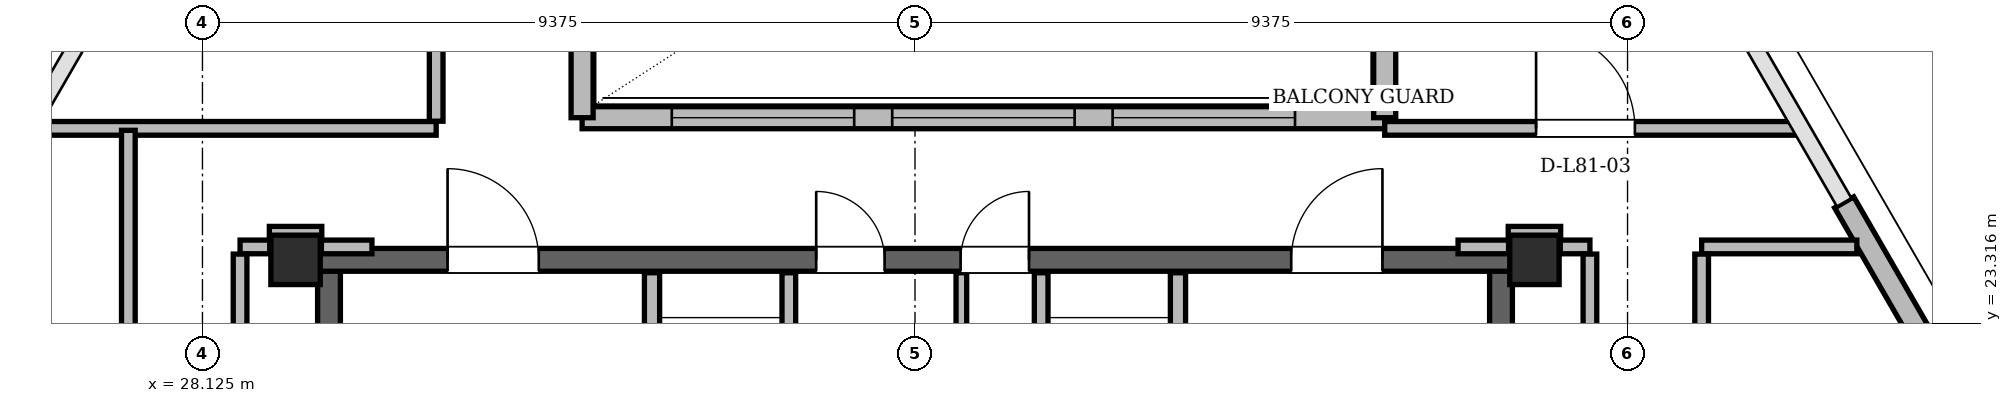
"""IFC4 building model, lengths in metres.
Left out: names, types, materials, properties, quantities, classifications, styles, units other than length and angle.
Written with IfcOpenShell. Run it as: python <this file> out.ifc"""

import sys

from ifc_helpers import new_model, si_unit, direction, frame, frame_2d, origin, origin_2d, place, context, subcontext, project, spatial, rectangle, hollow_rectangle, extrude, element, fill, save


model = new_model("IFC4")
c1 = context("Model", 3, precision=1e-05, world=origin(), true_north=direction((0.0, 1.0)))
c2 = subcontext(c1, "Body", "Model", "MODEL_VIEW")
j1 = project(units=[si_unit("LENGTHUNIT", "METRE"), si_unit("PLANEANGLEUNIT", "RADIAN")], contexts=[c1])
p1 = place(None, origin())
s1 = spatial("IfcSite", under=j1, at=p1, CompositionType="ELEMENT")
p2 = place(p1, origin())
s2 = spatial("IfcBuilding", under=s1, at=p2, CompositionType="ELEMENT")
p3 = place(p2, frame((0.0, 0.0, 309.6)))
s3 = spatial("IfcBuildingStorey", under=s2, at=p3, CompositionType="ELEMENT", Elevation=309.6)
for number, where, z_axis, x_axis in (
    (1, (45.65, 24.15, 0.0), (0.0, 0.0, 1.0), (1.0, 0.0, 0.0)),
    (2, (29.35, 24.15, 0.0), (0.0, 0.0, 1.0), (1.0, 0.0, 0.0)),
):
    element("IfcColumn", number, at=place(p3, frame(where, z_axis=z_axis, x_axis=x_axis)), inside=s3, PredefinedType="COLUMN", context=c2, shape_type="SweptSolid", body=[
        extrude(hollow_rectangle(XDim=0.65, YDim=0.65, WallThickness=0.05, at=origin_2d()), origin(), (0.0, 0.0, 1.0), 4.5),
    ])
for number, where, z_axis, x_axis in (
    (3, (29.79, 11.0, 0.0), (0.0, 0.0, 1.0), (0.0, 1.0, 0.0)),
    (4, (45.21, 11.0, 0.0), (0.0, 0.0, 1.0), (0.0, 1.0, 0.0)),
):
    element("IfcWall", number, at=place(p3, frame(where, z_axis=z_axis, x_axis=x_axis)), inside=s3, PredefinedType="SHEAR", context=c2, shape_type="SweptSolid", body=[
        extrude(rectangle(XDim=13.3, YDim=0.3, at=frame_2d((6.65, 0.0))), origin(), (0.0, 0.0, 1.0), 4.24),
    ])
p4 = place(p3, frame((29.65, 24.15, 0.0), z_axis=(0.0, 0.0, 1.0), x_axis=(1.0, 0.0, 0.0)))
e5 = element("IfcWall", 5, at=p4, inside=s3, PredefinedType="SHEAR", context=c2, shape_type="SweptSolid", body=[
    extrude(rectangle(XDim=15.7, YDim=0.3, at=frame_2d((7.85, 0.0))), origin(), (0.0, 0.0, 1.0), 4.24),
])
p5 = place(p4, frame((1.7, 0.0, 0.0)))
e6 = element("IfcOpeningElement", 6, at=p5, cuts=e5, PredefinedType="OPENING", context=c2, shape_type="SweptSolid", body=[
    extrude(rectangle(XDim=1.2, YDim=2.2, at=frame_2d((0.6, 1.1))), frame((0.0, 0.15, 0.0), z_axis=(0.0, -1.0, 0.0), x_axis=(1.0, 0.0, 0.0)), (0.0, 0.0, 1.0), 0.3),
])
p6 = place(p4, frame((12.8, 0.0, 0.0)))
e7 = element("IfcOpeningElement", 7, at=p6, cuts=e5, PredefinedType="OPENING", context=c2, shape_type="SweptSolid", body=[
    extrude(rectangle(XDim=1.2, YDim=2.2, at=frame_2d((0.6, 1.1))), frame((0.0, 0.15, 0.0), z_axis=(0.0, -1.0, 0.0), x_axis=(1.0, 0.0, 0.0)), (0.0, 0.0, 1.0), 0.3),
])
p7 = place(p4, frame((6.55, 0.0, 0.0)))
e8 = element("IfcOpeningElement", 8, at=p7, cuts=e5, PredefinedType="OPENING", context=c2, shape_type="SweptSolid", body=[
    extrude(rectangle(XDim=0.9, YDim=2.05, at=frame_2d((0.45, 1.025))), frame((0.0, 0.15, 0.0), z_axis=(0.0, -1.0, 0.0), x_axis=(1.0, 0.0, 0.0)), (0.0, 0.0, 1.0), 0.3),
])
p8 = place(p4, frame((8.45, 0.0, 0.0)))
e9 = element("IfcOpeningElement", 9, at=p8, cuts=e5, PredefinedType="OPENING", context=c2, shape_type="SweptSolid", body=[
    extrude(rectangle(XDim=0.9, YDim=2.05, at=frame_2d((0.45, 1.025))), frame((0.0, 0.15, 0.0), z_axis=(0.0, -1.0, 0.0), x_axis=(1.0, 0.0, 0.0)), (0.0, 0.0, 1.0), 0.3),
])
p9 = place(p3, frame((58.186, 10.252, 0.0), z_axis=(0.0, 0.0, 1.0), x_axis=(-0.500001379048, 0.866024607589, 0.0)))
e10 = element("IfcWall", 10, at=p9, inside=s3, PredefinedType="SOLIDWALL", context=c2, shape_type="SweptSolid", body=[
    extrude(rectangle(XDim=16.921, YDim=0.29, at=frame_2d((8.461, 0.0))), origin(), (0.0, 0.0, 1.0), 3.618),
])
p10 = place(p9, frame((2.222, 0.0, 0.85)))
e11 = element("IfcOpeningElement", 11, at=p10, cuts=e10, PredefinedType="OPENING", context=c2, shape_type="SweptSolid", body=[
    extrude(rectangle(XDim=3.0, YDim=2.25, at=frame_2d((1.5, 1.125))), frame((0.0, 0.145, 0.0), z_axis=(0.0, -1.0, 0.0), x_axis=(1.0, 0.0, 0.0)), (0.0, 0.0, 1.0), 0.29),
])
p11 = place(p9, frame((7.788, 0.0, 0.85)))
e12 = element("IfcOpeningElement", 12, at=p11, cuts=e10, PredefinedType="OPENING", context=c2, shape_type="SweptSolid", body=[
    extrude(rectangle(XDim=2.6, YDim=1.95, at=frame_2d((1.3, 0.975))), frame((0.0, 0.145, 0.0), z_axis=(0.0, -1.0, 0.0), x_axis=(1.0, 0.0, 0.0)), (0.0, 0.0, 1.0), 0.29),
])
p12 = place(p3, frame((33.12, 26.02, 0.0), z_axis=(0.0, 0.0, 1.0), x_axis=(1.0, 0.0, 0.0)))
e13 = element("IfcWall", 13, at=p12, inside=s3, PredefinedType="SOLIDWALL", context=c2, shape_type="SweptSolid", body=[
    extrude(rectangle(XDim=10.56, YDim=0.29, at=frame_2d((5.28, 0.0))), origin(), (0.0, 0.0, 1.0), 4.24),
])
p13 = place(p12, frame((1.18, 0.0, 0.9)))
e14 = element("IfcOpeningElement", 14, at=p13, cuts=e13, PredefinedType="OPENING", context=c2, shape_type="SweptSolid", body=[
    extrude(rectangle(XDim=2.4, YDim=1.9, at=frame_2d((1.2, 0.95))), frame((0.0, 0.145, 0.0), z_axis=(0.0, -1.0, 0.0), x_axis=(1.0, 0.0, 0.0)), (0.0, 0.0, 1.0), 0.29),
])
p14 = place(p12, frame((4.08, 0.0, 0.9)))
e15 = element("IfcOpeningElement", 15, at=p14, cuts=e13, PredefinedType="OPENING", context=c2, shape_type="SweptSolid", body=[
    extrude(rectangle(XDim=2.4, YDim=1.9, at=frame_2d((1.2, 0.95))), frame((0.0, 0.145, 0.0), z_axis=(0.0, -1.0, 0.0), x_axis=(1.0, 0.0, 0.0)), (0.0, 0.0, 1.0), 0.29),
])
p15 = place(p12, frame((6.98, 0.0, 0.9)))
e16 = element("IfcOpeningElement", 16, at=p15, cuts=e13, PredefinedType="OPENING", context=c2, shape_type="SweptSolid", body=[
    extrude(rectangle(XDim=2.4, YDim=1.9, at=frame_2d((1.2, 0.95))), frame((0.0, 0.145, 0.0), z_axis=(0.0, -1.0, 0.0), x_axis=(1.0, 0.0, 0.0)), (0.0, 0.0, 1.0), 0.29),
])
p16 = place(p3, frame((33.12, 26.02, 0.0), z_axis=(0.0, 0.0, 1.0), x_axis=(0.0, 1.0, 0.0)))
e17 = element("IfcWall", 17, at=p16, inside=s3, PredefinedType="SOLIDWALL", context=c2, shape_type="SweptSolid", body=[
    extrude(rectangle(XDim=6.96, YDim=0.29, at=frame_2d((3.48, 0.0))), origin(), (0.0, 0.0, 1.0), 4.24),
])
p17 = place(p3, frame((43.68, 26.02, 0.0), z_axis=(0.0, 0.0, 1.0), x_axis=(0.0, 1.0, 0.0)))
e18 = element("IfcWall", 18, at=p17, inside=s3, PredefinedType="SOLIDWALL", context=c2, shape_type="SweptSolid", body=[
    extrude(rectangle(XDim=6.96, YDim=0.29, at=frame_2d((3.48, 0.0))), origin(), (0.0, 0.0, 1.0), 3.826),
])
p18 = place(p3, frame((34.04, 19.48, 0.0), z_axis=(0.0, 0.0, 1.0), x_axis=(0.0, 1.0, 0.0)))
e19 = element("IfcWall", 19, at=p18, inside=s3, PredefinedType="PARTITIONING", context=c2, shape_type="SweptSolid", body=[
    extrude(rectangle(XDim=4.5, YDim=0.2, at=frame_2d((2.25, 0.0))), origin(), (0.0, 0.0, 1.0), 4.24),
])
p19 = place(p18, frame((2.12, 0.0, 0.0)))
e20 = element("IfcOpeningElement", 20, at=p19, cuts=e19, PredefinedType="OPENING", context=c2, shape_type="SweptSolid", body=[
    extrude(rectangle(XDim=1.1, YDim=2.2, at=frame_2d((0.55, 1.1))), frame((0.0, 0.1, 0.0), z_axis=(0.0, -1.0, 0.0), x_axis=(1.0, 0.0, 0.0)), (0.0, 0.0, 1.0), 0.2),
])
p20 = place(p3, frame((35.84, 20.96, 0.0), z_axis=(0.0, 0.0, 1.0), x_axis=(0.0, 1.0, 0.0)))
e21 = element("IfcWall", 21, at=p20, inside=s3, PredefinedType="PARTITIONING", context=c2, shape_type="SweptSolid", body=[
    extrude(rectangle(XDim=3.02, YDim=0.18, at=frame_2d((1.51, 0.0))), origin(), (0.0, 0.0, 1.0), 4.24),
])
p21 = place(p3, frame((40.96, 19.48, 0.0), z_axis=(0.0, 0.0, 1.0), x_axis=(0.0, 1.0, 0.0)))
e22 = element("IfcWall", 22, at=p21, inside=s3, PredefinedType="PARTITIONING", context=c2, shape_type="SweptSolid", body=[
    extrude(rectangle(XDim=4.5, YDim=0.2, at=frame_2d((2.25, 0.0))), origin(), (0.0, 0.0, 1.0), 4.24),
])
p22 = place(p21, frame((2.12, 0.0, 0.0)))
e23 = element("IfcOpeningElement", 23, at=p22, cuts=e22, PredefinedType="OPENING", context=c2, shape_type="SweptSolid", body=[
    extrude(rectangle(XDim=1.1, YDim=2.2, at=frame_2d((0.55, 1.1))), frame((0.0, 0.1, 0.0), z_axis=(0.0, -1.0, 0.0), x_axis=(1.0, 0.0, 0.0)), (0.0, 0.0, 1.0), 0.2),
])
p23 = place(p3, frame((39.16, 20.96, 0.0), z_axis=(0.0, 0.0, 1.0), x_axis=(0.0, 1.0, 0.0)))
e24 = element("IfcWall", 24, at=p23, inside=s3, PredefinedType="PARTITIONING", context=c2, shape_type="SweptSolid", body=[
    extrude(rectangle(XDim=3.02, YDim=0.18, at=frame_2d((1.51, 0.0))), origin(), (0.0, 0.0, 1.0), 4.24),
])
p24 = place(p3, frame((38.11, 21.06, 0.0), z_axis=(0.0, 0.0, 1.0), x_axis=(0.0, 1.0, 0.0)))
e25 = element("IfcWall", 25, at=p24, inside=s3, PredefinedType="PARTITIONING", context=c2, shape_type="SweptSolid", body=[
    extrude(rectangle(XDim=2.92, YDim=0.14, at=frame_2d((1.46, 0.0))), origin(), (0.0, 0.0, 1.0), 4.24),
])
p25 = place(p3, frame((28.62, 24.32, 0.0), z_axis=(0.0, 0.0, 1.0), x_axis=(1.0, 0.0, 0.0)))
e26 = element("IfcWall", 26, at=p25, inside=s3, PredefinedType="PARTITIONING", context=c2, shape_type="SweptSolid", body=[
    extrude(rectangle(XDim=0.39, YDim=0.18, at=frame_2d((0.195, 0.0))), origin(), (0.0, 0.0, 1.0), 4.24),
])
for number, where, z_axis, x_axis in (
    (27, (29.69, 24.32, 0.0), (0.0, 0.0, 1.0), (1.0, 0.0, 0.0)),
    (28, (44.645, 24.32, 0.0), (0.0, 0.0, 1.0), (1.0, 0.0, 0.0)),
):
    element("IfcWall", number, at=place(p3, frame(where, z_axis=z_axis, x_axis=x_axis)), inside=s3, PredefinedType="PARTITIONING", context=c2, shape_type="SweptSolid", body=[
        extrude(rectangle(XDim=0.665, YDim=0.18, at=frame_2d((0.333, 0.0))), origin(), (0.0, 0.0, 1.0), 3.38),
    ])
p26 = place(p3, frame((45.99, 24.32, 0.0), z_axis=(0.0, 0.0, 1.0), x_axis=(1.0, 0.0, 0.0)))
e29 = element("IfcWall", 29, at=p26, inside=s3, PredefinedType="PARTITIONING", context=c2, shape_type="SweptSolid", body=[
    extrude(rectangle(XDim=0.39, YDim=0.18, at=frame_2d((0.195, 0.0))), origin(), (0.0, 0.0, 1.0), 4.24),
])
p27 = place(p3, frame((47.85, 24.32, 0.0), z_axis=(0.0, 0.0, 1.0), x_axis=(1.0, 0.0, 0.0)))
e30 = element("IfcWall", 30, at=p27, inside=s3, PredefinedType="PARTITIONING", context=c2, shape_type="SweptSolid", body=[
    extrude(rectangle(XDim=2.042, YDim=0.18, at=frame_2d((1.021, 0.0))), origin(), (0.0, 0.0, 1.0), 4.24),
])
for number, where, z_axis, x_axis in (
    (31, (29.005, 24.5, 0.0), (0.0, 0.0, 1.0), (1.0, 0.0, 0.0)),
    (32, (45.305, 24.5, 0.0), (0.0, 0.0, 1.0), (1.0, 0.0, 0.0)),
):
    element("IfcWall", number, at=place(p3, frame(where, z_axis=z_axis, x_axis=x_axis)), inside=s3, PredefinedType="PARTITIONING", context=c2, shape_type="SweptSolid", body=[
        extrude(rectangle(XDim=0.69, YDim=0.18, at=frame_2d((0.345, 0.0))), origin(), (0.0, 0.0, 1.0), 3.826),
    ])
p28 = place(p3, frame((25.9, 25.88, 0.0), z_axis=(0.0, 0.0, 1.0), x_axis=(1.0, 0.0, 0.0)))
e33 = element("IfcWall", 33, at=p28, inside=s3, PredefinedType="PARTITIONING", context=c2, shape_type="SweptSolid", body=[
    extrude(rectangle(XDim=5.3, YDim=0.18, at=frame_2d((2.65, 0.0))), origin(), (0.0, 0.0, 1.0), 3.618),
])
p29 = place(p3, frame((43.68, 25.88, 0.0), z_axis=(0.0, 0.0, 1.0), x_axis=(1.0, 0.0, 0.0)))
e34 = element("IfcWall", 34, at=p29, inside=s3, PredefinedType="PARTITIONING", context=c2, shape_type="SweptSolid", body=[
    extrude(rectangle(XDim=5.42, YDim=0.18, at=frame_2d((2.71, 0.0))), origin(), (0.0, 0.0, 1.0), 3.618),
])
p30 = place(p29, frame((1.992, 0.0, 0.0)))
e35 = element("IfcOpeningElement", 35, at=p30, cuts=e34, PredefinedType="OPENING", context=c2, shape_type="SweptSolid", body=[
    extrude(rectangle(XDim=1.3, YDim=2.2, at=frame_2d((0.65, 1.1))), frame((0.0, 0.09, 0.0), z_axis=(0.0, -1.0, 0.0), x_axis=(1.0, 0.0, 0.0)), (0.0, 0.0, 1.0), 0.18),
])
p31 = place(p3, frame((27.15, 9.394, 0.0), z_axis=(0.0, 0.0, 1.0), x_axis=(0.0, 1.0, 0.0)))
e36 = element("IfcWall", 36, at=p31, inside=s3, PredefinedType="PARTITIONING", context=c2, shape_type="SweptSolid", body=[
    extrude(rectangle(XDim=16.46, YDim=0.18, at=frame_2d((8.23, 0.0))), origin(), (0.0, 0.0, 1.0), 3.826),
])
p32 = place(p31, frame((5.383, 0.0, 0.0)))
e37 = element("IfcOpeningElement", 37, at=p32, cuts=e36, PredefinedType="OPENING", context=c2, shape_type="SweptSolid", body=[
    extrude(rectangle(XDim=1.3, YDim=2.2, at=frame_2d((0.65, 1.1))), frame((0.0, 0.09, 0.0), z_axis=(0.0, -1.0, 0.0), x_axis=(1.0, 0.0, 0.0)), (0.0, 0.0, 1.0), 0.18),
])
p33 = place(p31, frame((12.016, 0.0, 0.0)))
e38 = element("IfcOpeningElement", 38, at=p33, cuts=e36, PredefinedType="OPENING", context=c2, shape_type="SweptSolid", body=[
    extrude(rectangle(XDim=1.3, YDim=2.2, at=frame_2d((0.65, 1.1))), frame((0.0, 0.09, 0.0), z_axis=(0.0, -1.0, 0.0), x_axis=(1.0, 0.0, 0.0)), (0.0, 0.0, 1.0), 0.18),
])
p34 = place(p3, frame((28.62, 11.044, 0.0), z_axis=(0.0, 0.0, 1.0), x_axis=(0.0, 1.0, 0.0)))
e39 = element("IfcWall", 39, at=p34, inside=s3, PredefinedType="PARTITIONING", context=c2, shape_type="SweptSolid", body=[
    extrude(rectangle(XDim=13.182, YDim=0.18, at=frame_2d((6.591, 0.0))), origin(), (0.0, 0.0, 1.0), 4.24),
])
p35 = place(p3, frame((31.2, 25.974, 0.0), z_axis=(0.0, 0.0, 1.0), x_axis=(0.0, 1.0, 0.0)))
e40 = element("IfcWall", 40, at=p35, inside=s3, PredefinedType="PARTITIONING", context=c2, shape_type="SweptSolid", body=[
    extrude(rectangle(XDim=8.732, YDim=0.18, at=frame_2d((4.366, 0.0))), origin(), (0.0, 0.0, 1.0), 3.826),
])
p36 = place(p35, frame((3.741, 0.0, 0.0)))
e41 = element("IfcOpeningElement", 41, at=p36, cuts=e40, PredefinedType="OPENING", context=c2, shape_type="SweptSolid", body=[
    extrude(rectangle(XDim=1.3, YDim=2.2, at=frame_2d((0.65, 1.1))), frame((0.0, 0.09, 0.0), z_axis=(0.0, -1.0, 0.0), x_axis=(1.0, 0.0, 0.0)), (0.0, 0.0, 1.0), 0.18),
])
p37 = place(p3, frame((46.38, 11.044, 0.0), z_axis=(0.0, 0.0, 1.0), x_axis=(0.0, 1.0, 0.0)))
e42 = element("IfcWall", 42, at=p37, inside=s3, PredefinedType="PARTITIONING", context=c2, shape_type="SweptSolid", body=[
    extrude(rectangle(XDim=13.182, YDim=0.18, at=frame_2d((6.591, 0.0))), origin(), (0.0, 0.0, 1.0), 4.24),
])
p38 = place(p3, frame((47.85, 19.268, 0.0), z_axis=(0.0, 0.0, 1.0), x_axis=(0.0, 1.0, 0.0)))
e43 = element("IfcWall", 43, at=p38, inside=s3, PredefinedType="PARTITIONING", context=c2, shape_type="SweptSolid", body=[
    extrude(rectangle(XDim=4.958, YDim=0.18, at=frame_2d((2.479, 0.0))), origin(), (0.0, 0.0, 1.0), 4.24),
])
p39 = place(p38, frame((0.5, 0.0, 0.0)))
e44 = element("IfcOpeningElement", 44, at=p39, cuts=e43, PredefinedType="OPENING", context=c2, shape_type="SweptSolid", body=[
    extrude(rectangle(XDim=0.88, YDim=2.08, at=frame_2d((0.44, 1.04))), frame((0.0, 0.09, 0.0), z_axis=(0.0, -1.0, 0.0), x_axis=(1.0, 0.0, 0.0)), (0.0, 0.0, 1.0), 0.18),
])
p40 = place(p38, frame((2.803, 0.0, 0.0)))
e45 = element("IfcOpeningElement", 45, at=p40, cuts=e43, PredefinedType="OPENING", context=c2, shape_type="SweptSolid", body=[
    extrude(rectangle(XDim=0.88, YDim=2.08, at=frame_2d((0.44, 1.04))), frame((0.0, 0.09, 0.0), z_axis=(0.0, -1.0, 0.0), x_axis=(1.0, 0.0, 0.0)), (0.0, 0.0, 1.0), 0.18),
])
p41 = place(p13, origin())
e46 = element("IfcWindow", 46, at=p41, inside=s3, PartitioningType="SINGLE_PANEL", PredefinedType="WINDOW", context=c2, shape_type="SweptSolid", body=[
    extrude(rectangle(XDim=2.4, YDim=1.9, at=frame_2d((1.2, 0.95))), frame((0.0, 0.03, 0.0), z_axis=(0.0, -1.0, 0.0), x_axis=(1.0, 0.0, 0.0)), (0.0, 0.0, 1.0), 0.06),
])
fill(e14, e46)
p42 = place(p14, origin())
e47 = element("IfcWindow", 47, at=p42, inside=s3, PartitioningType="SINGLE_PANEL", PredefinedType="WINDOW", context=c2, shape_type="SweptSolid", body=[
    extrude(rectangle(XDim=2.4, YDim=1.9, at=frame_2d((1.2, 0.95))), frame((0.0, 0.03, 0.0), z_axis=(0.0, -1.0, 0.0), x_axis=(1.0, 0.0, 0.0)), (0.0, 0.0, 1.0), 0.06),
])
fill(e15, e47)
p43 = place(p15, origin())
e48 = element("IfcWindow", 48, at=p43, inside=s3, PartitioningType="SINGLE_PANEL", PredefinedType="WINDOW", context=c2, shape_type="SweptSolid", body=[
    extrude(rectangle(XDim=2.4, YDim=1.9, at=frame_2d((1.2, 0.95))), frame((0.0, 0.03, 0.0), z_axis=(0.0, -1.0, 0.0), x_axis=(1.0, 0.0, 0.0)), (0.0, 0.0, 1.0), 0.06),
])
fill(e16, e48)
p44 = place(p5, origin())
e49 = element("IfcDoor", 49, at=p44, inside=s3, OperationType="SINGLE_SWING_LEFT", PredefinedType="DOOR", context=c2, shape_type="SweptSolid", body=[
    extrude(rectangle(XDim=1.2, YDim=2.2, at=frame_2d((0.6, 1.1))), frame((0.0, 0.025, 0.0), z_axis=(0.0, -1.0, 0.0), x_axis=(1.0, 0.0, 0.0)), (0.0, 0.0, 1.0), 0.05),
])
fill(e6, e49)
p45 = place(p6, origin())
e50 = element("IfcDoor", 50, at=p45, inside=s3, OperationType="SINGLE_SWING_RIGHT", PredefinedType="DOOR", context=c2, shape_type="SweptSolid", body=[
    extrude(rectangle(XDim=1.2, YDim=2.2, at=frame_2d((0.6, 1.1))), frame((0.0, 0.025, 0.0), z_axis=(0.0, -1.0, 0.0), x_axis=(1.0, 0.0, 0.0)), (0.0, 0.0, 1.0), 0.05),
])
fill(e7, e50)
p46 = place(p7, origin())
e51 = element("IfcDoor", 51, at=p46, inside=s3, OperationType="SINGLE_SWING_LEFT", PredefinedType="DOOR", context=c2, shape_type="SweptSolid", body=[
    extrude(rectangle(XDim=0.9, YDim=2.05, at=frame_2d((0.45, 1.025))), frame((0.0, 0.025, 0.0), z_axis=(0.0, -1.0, 0.0), x_axis=(1.0, 0.0, 0.0)), (0.0, 0.0, 1.0), 0.05),
])
fill(e8, e51)
p47 = place(p8, origin())
e52 = element("IfcDoor", 52, at=p47, inside=s3, OperationType="SINGLE_SWING_RIGHT", PredefinedType="DOOR", context=c2, shape_type="SweptSolid", body=[
    extrude(rectangle(XDim=0.9, YDim=2.05, at=frame_2d((0.45, 1.025))), frame((0.0, 0.025, 0.0), z_axis=(0.0, -1.0, 0.0), x_axis=(1.0, 0.0, 0.0)), (0.0, 0.0, 1.0), 0.05),
])
fill(e9, e52)
p48 = place(p30, origin())
e53 = element("IfcDoor", 53, at=p48, inside=s3, OperationType="SINGLE_SWING_LEFT", PredefinedType="DOOR", context=c2, shape_type="SweptSolid", body=[
    extrude(rectangle(XDim=1.3, YDim=2.2, at=frame_2d((0.65, 1.1))), frame((0.0, 0.025, 0.0), z_axis=(0.0, -1.0, 0.0), x_axis=(1.0, 0.0, 0.0)), (0.0, 0.0, 1.0), 0.05),
])
fill(e35, e53)
save(model, sys.argv[1])
